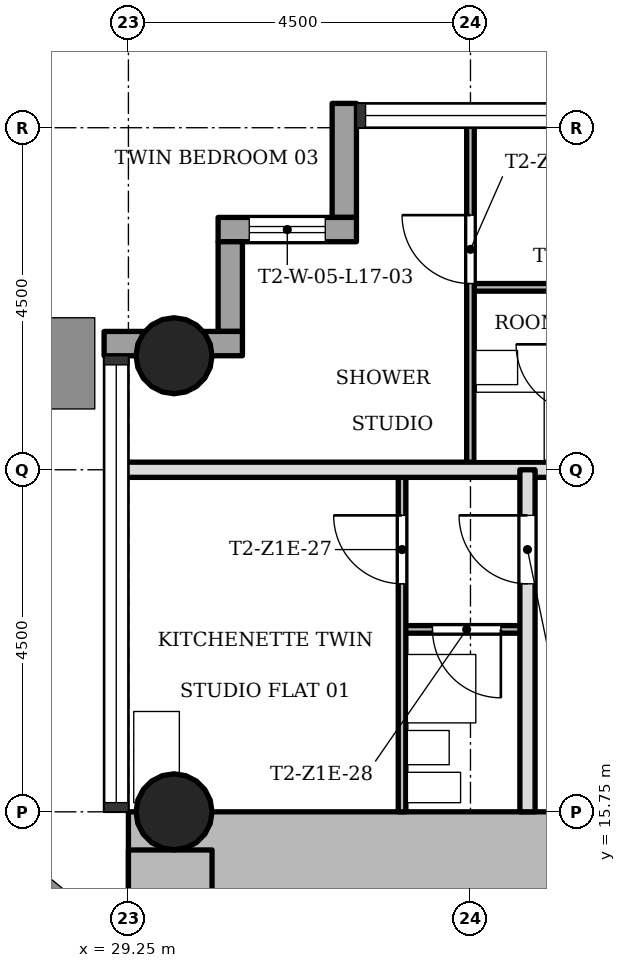
"""IFC4 building model, lengths in metres.
Left out: names, types, materials, properties, quantities, classifications, styles, units other than length and angle.
Written with IfcOpenShell. Run it as: python <this file> out.ifc"""

import sys

from ifc_helpers import new_model, si_unit, direction, frame, frame_2d, origin, origin_2d, place, context, subcontext, project, spatial, rectangle, hollow_circle, extrude, element, fill, save


model = new_model("IFC4")
c1 = context("Model", 3, precision=1e-05, world=origin(), true_north=direction((0.0, 1.0)))
c2 = subcontext(c1, "Body", "Model", "MODEL_VIEW")
j1 = project(units=[si_unit("LENGTHUNIT", "METRE"), si_unit("PLANEANGLEUNIT", "RADIAN")], contexts=[c1])
p1 = place(None, origin())
s1 = spatial("IfcSite", under=j1, at=p1, CompositionType="ELEMENT")
p2 = place(p1, origin())
s2 = spatial("IfcBuilding", under=s1, at=p2, CompositionType="ELEMENT")
p3 = place(p2, frame((0.0, 0.0, 65.3)))
s3 = spatial("IfcBuildingStorey", under=s2, at=p3, CompositionType="ELEMENT", Elevation=65.3)
p4 = place(p3, frame((41.65, 15.2, 0.0), z_axis=(0.0, 0.0, 1.0), x_axis=(-1.0, 0.0, 0.0)))
e1 = element("IfcWall", 1, at=p4, inside=s3, PredefinedType="SHEAR", context=c2, shape_type="SweptSolid", body=[
    extrude(rectangle(XDim=12.4, YDim=1.1, at=frame_2d((6.2, 0.0))), origin(), (0.0, 0.0, 1.0), 3.4),
])
p5 = place(p4, frame((4.75, 0.0, 0.0)))
e2 = element("IfcOpeningElement", 2, at=p5, cuts=e1, PredefinedType="OPENING", context=c2, shape_type="SweptSolid", body=[
    extrude(rectangle(XDim=1.8, YDim=2.1, at=frame_2d((0.9, 1.05))), frame((0.0, 0.56, 0.0), z_axis=(0.0, -1.0, 0.0), x_axis=(1.0, 0.0, 0.0)), (0.0, 0.0, 1.0), 1.12),
])
p6 = place(p3, frame((29.8, 15.248, 0.0), z_axis=(0.0, 0.0, 1.0), x_axis=(0.0, -1.0, 0.0)))
e3 = element("IfcWall", 3, at=p6, inside=s3, PredefinedType="SHEAR", context=c2, shape_type="SweptSolid", body=[
    extrude(rectangle(XDim=8.596, YDim=1.1, at=frame_2d((4.298, 0.0))), origin(), (0.0, 0.0, 1.0), 3.4),
])
for number, where, z_axis, x_axis in (
    (4, (29.85, 15.75, 0.0), (0.0, 0.0, 1.0), (1.0, 0.0, 0.0)),
    (5, (29.85, 21.75, 0.0), (0.0, 0.0, 1.0), (1.0, 0.0, 0.0)),
):
    element("IfcColumn", number, at=place(p3, frame(where, z_axis=z_axis, x_axis=x_axis)), inside=s3, PredefinedType="COLUMN", context=c2, shape_type="SweptSolid", body=[
        extrude(hollow_circle(Radius=0.5, WallThickness=0.036, at=origin_2d()), origin(), (0.0, 0.0, 1.0), 3.4),
    ])
p7 = place(p3, frame((32.09, 25.07, -0.3), z_axis=(0.0, 0.0, 1.0), x_axis=(0.0, -1.0, 0.0)))
e6 = element("IfcWall", 6, at=p7, inside=s3, PredefinedType="STANDARD", context=c2, shape_type="SweptSolid", body=[
    extrude(rectangle(XDim=1.5, YDim=0.32, at=frame_2d((0.75, 0.0))), origin(), (0.0, 0.0, 1.0), 3.4),
])
p8 = place(p3, frame((32.25, 23.41, -0.3), z_axis=(0.0, 0.0, 1.0), x_axis=(-1.0, 0.0, 0.0)))
e7 = element("IfcWall", 7, at=p8, inside=s3, PredefinedType="STANDARD", context=c2, shape_type="SweptSolid", body=[
    extrude(rectangle(XDim=1.82, YDim=0.32, at=frame_2d((0.91, 0.0))), origin(), (0.0, 0.0, 1.0), 3.4),
])
p9 = place(p8, frame((0.41, 0.0, 1.2)))
e8 = element("IfcOpeningElement", 8, at=p9, cuts=e7, PredefinedType="OPENING", context=c2, shape_type="SweptSolid", body=[
    extrude(rectangle(XDim=1.0, YDim=1.5, at=frame_2d((0.5, 0.75))), frame((0.0, 0.17, 0.0), z_axis=(0.0, -1.0, 0.0), x_axis=(1.0, 0.0, 0.0)), (0.0, 0.0, 1.0), 0.34),
])
p10 = place(p3, frame((30.59, 23.25, -0.3), z_axis=(0.0, 0.0, 1.0), x_axis=(0.0, -1.0, 0.0)))
e9 = element("IfcWall", 9, at=p10, inside=s3, PredefinedType="STANDARD", context=c2, shape_type="SweptSolid", body=[
    extrude(rectangle(XDim=1.18, YDim=0.32, at=frame_2d((0.59, 0.0))), origin(), (0.0, 0.0, 1.0), 3.4),
])
p11 = place(p3, frame((30.75, 21.91, -0.3), z_axis=(0.0, 0.0, 1.0), x_axis=(-1.0, 0.0, 0.0)))
e10 = element("IfcWall", 10, at=p11, inside=s3, PredefinedType="STANDARD", context=c2, shape_type="SweptSolid", body=[
    extrude(rectangle(XDim=1.82, YDim=0.32, at=frame_2d((0.91, 0.0))), origin(), (0.0, 0.0, 1.0), 3.4),
])
p12 = place(p3, frame((34.5, 18.15, 0.0), z_axis=(0.0, 0.0, 1.0), x_axis=(-1.0, 0.0, 0.0)))
e11 = element("IfcWall", 11, at=p12, inside=s3, PredefinedType="PARTITIONING", context=c2, shape_type="SweptSolid", body=[
    extrude(rectangle(XDim=1.65, YDim=0.1, at=frame_2d((0.825, 0.0))), origin(), (0.0, 0.0, 1.0), 3.0),
])
p13 = place(p12, frame((0.35, 0.0, 0.0)))
e12 = element("IfcOpeningElement", 12, at=p13, cuts=e11, PredefinedType="OPENING", context=c2, shape_type="SweptSolid", body=[
    extrude(rectangle(XDim=0.9, YDim=2.1, at=frame_2d((0.45, 1.05))), frame((0.0, 0.06, 0.0), z_axis=(0.0, -1.0, 0.0), x_axis=(1.0, 0.0, 0.0)), (0.0, 0.0, 1.0), 0.12),
])
p14 = place(p3, frame((42.85, 20.25, 0.0), z_axis=(0.0, 0.0, 1.0), x_axis=(-1.0, 0.0, 0.0)))
e13 = element("IfcWall", 13, at=p14, inside=s3, PredefinedType="SOLIDWALL", context=c2, shape_type="SweptSolid", body=[
    extrude(rectangle(XDim=13.7, YDim=0.2, at=frame_2d((6.85, 0.0))), origin(), (0.0, 0.0, 1.0), 3.0),
])
p15 = place(p14, frame((6.4, 0.0, 0.0)))
e14 = element("IfcOpeningElement", 14, at=p15, cuts=e13, PredefinedType="OPENING", context=c2, shape_type="SweptSolid", body=[
    extrude(rectangle(XDim=0.9, YDim=2.1, at=frame_2d((0.45, 1.05))), frame((0.0, 0.11, 0.0), z_axis=(0.0, -1.0, 0.0), x_axis=(1.0, 0.0, 0.0)), (0.0, 0.0, 1.0), 0.22),
])
p16 = place(p3, frame((35.25, 22.65, 0.0), z_axis=(0.0, 0.0, 1.0), x_axis=(-1.0, 0.0, 0.0)))
e15 = element("IfcWall", 15, at=p16, inside=s3, PredefinedType="PARTITIONING", context=c2, shape_type="SweptSolid", body=[
    extrude(rectangle(XDim=1.5, YDim=0.1, at=frame_2d((0.75, 0.0))), origin(), (0.0, 0.0, 1.0), 3.0),
])
p17 = place(p3, frame((34.5, 15.75, 0.0), z_axis=(0.0, 0.0, 1.0), x_axis=(0.0, 1.0, 0.0)))
e16 = element("IfcWall", 16, at=p17, inside=s3, PredefinedType="SOLIDWALL", context=c2, shape_type="SweptSolid", body=[
    extrude(rectangle(XDim=4.5, YDim=0.2, at=frame_2d((2.25, 0.0))), origin(), (0.0, 0.0, 1.0), 3.0),
])
p18 = place(p17, frame((3.0, 0.0, 0.0)))
e17 = element("IfcOpeningElement", 17, at=p18, cuts=e16, PredefinedType="OPENING", context=c2, shape_type="SweptSolid", body=[
    extrude(rectangle(XDim=0.9, YDim=2.1, at=frame_2d((0.45, 1.05))), frame((0.0, 0.11, 0.0), z_axis=(0.0, -1.0, 0.0), x_axis=(1.0, 0.0, 0.0)), (0.0, 0.0, 1.0), 0.22),
])
p19 = place(p3, frame((33.75, 20.25, 0.0), z_axis=(0.0, 0.0, 1.0), x_axis=(0.0, 1.0, 0.0)))
e18 = element("IfcWall", 18, at=p19, inside=s3, PredefinedType="PARTITIONING", context=c2, shape_type="SweptSolid", body=[
    extrude(rectangle(XDim=4.6, YDim=0.1, at=frame_2d((2.3, 0.0))), origin(), (0.0, 0.0, 1.0), 3.0),
])
p20 = place(p19, frame((2.45, 0.0, 0.0)))
e19 = element("IfcOpeningElement", 19, at=p20, cuts=e18, PredefinedType="OPENING", context=c2, shape_type="SweptSolid", body=[
    extrude(rectangle(XDim=0.9, YDim=2.1, at=frame_2d((0.45, 1.05))), frame((0.0, 0.06, 0.0), z_axis=(0.0, -1.0, 0.0), x_axis=(1.0, 0.0, 0.0)), (0.0, 0.0, 1.0), 0.12),
])
p21 = place(p3, frame((32.85, 15.75, 0.0), z_axis=(0.0, 0.0, 1.0), x_axis=(0.0, 1.0, 0.0)))
e20 = element("IfcWall", 20, at=p21, inside=s3, PredefinedType="PARTITIONING", context=c2, shape_type="SweptSolid", body=[
    extrude(rectangle(XDim=4.5, YDim=0.1, at=frame_2d((2.25, 0.0))), origin(), (0.0, 0.0, 1.0), 3.0),
])
p22 = place(p21, frame((3.0, 0.0, 0.0)))
e21 = element("IfcOpeningElement", 21, at=p22, cuts=e20, PredefinedType="OPENING", context=c2, shape_type="SweptSolid", body=[
    extrude(rectangle(XDim=0.9, YDim=2.1, at=frame_2d((0.45, 1.05))), frame((0.0, 0.06, 0.0), z_axis=(0.0, -1.0, 0.0), x_axis=(1.0, 0.0, 0.0)), (0.0, 0.0, 1.0), 0.12),
])
p23 = place(p18, origin())
e22 = element("IfcDoor", 22, at=p23, inside=s3, OperationType="SINGLE_SWING_LEFT", PredefinedType="DOOR", context=c2, shape_type="SweptSolid", body=[
    extrude(rectangle(XDim=0.9, YDim=2.1, at=frame_2d((0.45, 1.05))), frame((0.0, 0.025, 0.0), z_axis=(0.0, -1.0, 0.0), x_axis=(1.0, 0.0, 0.0)), (0.0, 0.0, 1.0), 0.05),
])
fill(e17, e22)
p24 = place(p22, origin())
e23 = element("IfcDoor", 23, at=p24, inside=s3, OperationType="SINGLE_SWING_LEFT", PredefinedType="DOOR", context=c2, shape_type="SweptSolid", body=[
    extrude(rectangle(XDim=0.9, YDim=2.1, at=frame_2d((0.45, 1.05))), frame((0.0, 0.025, 0.0), z_axis=(0.0, -1.0, 0.0), x_axis=(1.0, 0.0, 0.0)), (0.0, 0.0, 1.0), 0.05),
])
fill(e21, e23)
p25 = place(p13, origin())
e24 = element("IfcDoor", 24, at=p25, inside=s3, OperationType="SINGLE_SWING_RIGHT", PredefinedType="DOOR", context=c2, shape_type="SweptSolid", body=[
    extrude(rectangle(XDim=0.9, YDim=2.1, at=frame_2d((0.45, 1.05))), frame((0.0, 0.025, 0.0), z_axis=(0.0, -1.0, 0.0), x_axis=(1.0, 0.0, 0.0)), (0.0, 0.0, 1.0), 0.05),
])
fill(e12, e24)
p26 = place(p20, origin())
e25 = element("IfcDoor", 25, at=p26, inside=s3, OperationType="SINGLE_SWING_LEFT", PredefinedType="DOOR", context=c2, shape_type="SweptSolid", body=[
    extrude(rectangle(XDim=0.9, YDim=2.1, at=frame_2d((0.45, 1.05))), frame((0.0, 0.025, 0.0), z_axis=(0.0, -1.0, 0.0), x_axis=(1.0, 0.0, 0.0)), (0.0, 0.0, 1.0), 0.05),
])
fill(e19, e25)
p27 = place(p9, origin())
e26 = element("IfcWindow", 26, at=p27, inside=s3, PartitioningType="SINGLE_PANEL", PredefinedType="WINDOW", context=c2, shape_type="SweptSolid", body=[
    extrude(rectangle(XDim=1.0, YDim=1.5, at=frame_2d((0.5, 0.75))), frame((0.0, 0.03, 0.0), z_axis=(0.0, -1.0, 0.0), x_axis=(1.0, 0.0, 0.0)), (0.0, 0.0, 1.0), 0.06),
])
fill(e8, e26)
save(model, sys.argv[1])
